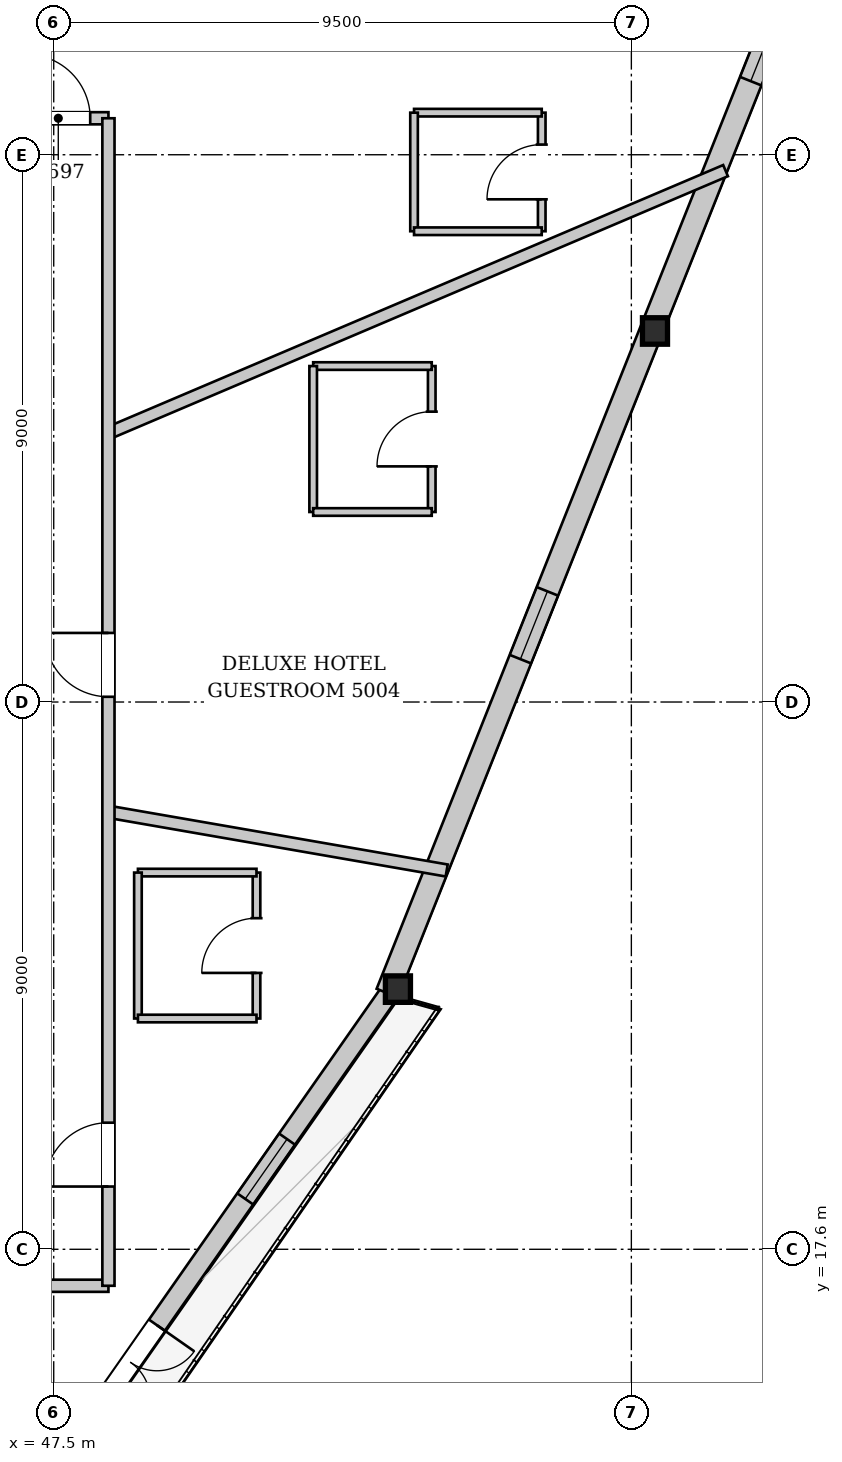
"""IFC4 building model, lengths in metres.
Left out: names, types, materials, properties, quantities, classifications, styles, units other than length and angle.
Written with IfcOpenShell. Run it as: python <this file> out.ifc"""

import sys

from ifc_helpers import new_model, si_unit, direction, frame, frame_2d, origin, origin_2d, place, context, subcontext, project, spatial, rectangle, i_section, extrude, source, transform, mapped, element, fill, save


model = new_model("IFC4")
c1 = context("Model", 3, precision=1e-05, world=origin(), true_north=direction((0.0, 1.0)))
c2 = subcontext(c1, "Body", "Model", "MODEL_VIEW")
j1 = project(units=[si_unit("LENGTHUNIT", "METRE"), si_unit("PLANEANGLEUNIT", "RADIAN")], contexts=[c1])
p1 = place(None, origin())
s1 = spatial("IfcSite", under=j1, at=p1, CompositionType="ELEMENT")
p2 = place(p1, origin())
s2 = spatial("IfcBuilding", under=s1, at=p2, CompositionType="ELEMENT")
p3 = place(p2, frame((0.0, 0.0, 189.2)))
s3 = spatial("IfcBuildingStorey", under=s2, at=p3, CompositionType="ELEMENT", Elevation=189.2)
m1 = source(origin(), c2, "Body", "SweptSolid", [
    extrude(i_section(OverallWidth=0.412, OverallDepth=0.435, WebThickness=0.031, FlangeThickness=0.05, at=origin_2d()), origin(), (0.0, 0.0, 1.0), 3.396),
])
p4 = place(p3, frame((53.164, 21.743, 0.0), z_axis=(-0.001509764212, 0.079873716149, 0.996803847344), x_axis=(-0.999821407128, -0.018898514446, 0.0)))
e1 = element("IfcColumn", 1, at=p4, inside=s3, PredefinedType="COLUMN", context=c2, shape_type="MappedRepresentation", body=[
    mapped(m1, transform((0.0, 0.0, 0.0), x_axis=(1.0, 0.0, 0.0), y_axis=(0.0, 1.0, 0.0), z_axis=(0.0, 0.0, 1.0), scale=1.0)),
])
m2 = source(origin(), c2, "Body", "SweptSolid", [
    extrude(i_section(OverallWidth=0.412, OverallDepth=0.435, WebThickness=0.031, FlangeThickness=0.05, at=origin_2d()), origin(), (0.0, 0.0, 1.0), 3.403),
])
p5 = place(p3, frame((57.468, 32.544, 0.0), z_axis=(-0.046628569909, 0.092468040943, 0.994623264293), x_axis=(-0.892898044648, -0.450258905369, 0.0)))
e2 = element("IfcColumn", 2, at=p5, inside=s3, PredefinedType="COLUMN", context=c2, shape_type="MappedRepresentation", body=[
    mapped(m2, transform((0.0, 0.0, 0.0), x_axis=(1.0, 0.0, 0.0), y_axis=(0.0, 1.0, 0.0), z_axis=(0.0, 0.0, 1.0), scale=1.0)),
])
p6 = place(p3, frame((53.032, 21.835, 0.0), z_axis=(0.0, 0.0, 1.0), x_axis=(-0.573201612269, -0.819414371178, 0.0)))
e3 = element("IfcWall", 3, at=p6, inside=s3, PredefinedType="SOLIDWALL", context=c2, shape_type="SweptSolid", body=[
    extrude(rectangle(XDim=23.255, YDim=0.32, at=frame_2d((11.627, 0.0))), origin(), (0.0, 0.0, 1.0), 2.722),
])
p7 = place(p6, frame((6.691, 0.0, 0.0)))
e4 = element("IfcOpeningElement", 4, at=p7, cuts=e3, PredefinedType="OPENING", context=c2, shape_type="SweptSolid", body=[
    extrude(rectangle(XDim=1.5, YDim=2.3, at=frame_2d((0.75, 1.15))), frame((0.0, 0.17, 0.0), z_axis=(0.0, -1.0, 0.0), x_axis=(1.0, 0.0, 0.0)), (0.0, 0.0, 1.0), 0.34),
])
p8 = place(p6, frame((14.308, 0.0, 0.252)))
e5 = element("IfcOpeningElement", 5, at=p8, cuts=e3, PredefinedType="OPENING", context=c2, shape_type="SweptSolid", body=[
    extrude(rectangle(XDim=2.6, YDim=2.35, at=frame_2d((1.3, 1.175))), frame((0.0, 0.17, 0.0), z_axis=(0.0, -1.0, 0.0), x_axis=(1.0, 0.0, 0.0)), (0.0, 0.0, 1.0), 0.34),
])
p9 = place(p6, frame((2.957, 0.0, 0.65)))
e6 = element("IfcOpeningElement", 6, at=p9, cuts=e3, PredefinedType="OPENING", context=c2, shape_type="SweptSolid", body=[
    extrude(rectangle(XDim=1.2, YDim=1.5, at=frame_2d((0.6, 0.75))), frame((0.0, 0.17, 0.0), z_axis=(0.0, -1.0, 0.0), x_axis=(1.0, 0.0, 0.0)), (0.0, 0.0, 1.0), 0.34),
])
p10 = place(p3, frame((61.596, 43.416, 0.0), z_axis=(0.0, 0.0, 1.0), x_axis=(-0.370190270335, -0.928955953611, 0.0)))
e7 = element("IfcWall", 7, at=p10, inside=s3, PredefinedType="SOLIDWALL", context=c2, shape_type="SweptSolid", body=[
    extrude(rectangle(XDim=23.255, YDim=0.38, at=frame_2d((11.627, 0.0))), origin(), (0.0, 0.0, 1.0), 2.722),
])
p11 = place(p10, frame((5.911, 0.0, 0.65)))
e8 = element("IfcOpeningElement", 8, at=p11, cuts=e7, PredefinedType="OPENING", context=c2, shape_type="SweptSolid", body=[
    extrude(rectangle(XDim=1.2, YDim=1.5, at=frame_2d((0.6, 0.75))), frame((0.0, 0.2, 0.0), z_axis=(0.0, -1.0, 0.0), x_axis=(1.0, 0.0, 0.0)), (0.0, 0.0, 1.0), 0.4),
])
p12 = place(p10, frame((16.143, 0.0, 0.65)))
e9 = element("IfcOpeningElement", 9, at=p12, cuts=e7, PredefinedType="OPENING", context=c2, shape_type="SweptSolid", body=[
    extrude(rectangle(XDim=1.2, YDim=1.5, at=frame_2d((0.6, 0.75))), frame((0.0, 0.2, 0.0), z_axis=(0.0, -1.0, 0.0), x_axis=(1.0, 0.0, 0.0)), (0.0, 0.0, 1.0), 0.4),
])
p13 = place(p3, frame((48.4, 24.795, 0.0), z_axis=(0.0, 0.0, 1.0), x_axis=(0.985274528665, -0.170979832624, 0.0)))
e10 = element("IfcWall", 10, at=p13, inside=s3, PredefinedType="PARTITIONING", context=c2, shape_type="SweptSolid", body=[
    extrude(rectangle(XDim=5.646, YDim=0.2, at=frame_2d((2.823, 0.0))), origin(), (0.0, 0.0, 1.0), 3.33),
])
p14 = place(p3, frame((48.4, 31.023, 0.0), z_axis=(0.0, 0.0, 1.0), x_axis=(0.920240648348, 0.391352972556, 0.0)))
e11 = element("IfcWall", 11, at=p14, inside=s3, PredefinedType="PARTITIONING", context=c2, shape_type="SweptSolid", body=[
    extrude(rectangle(XDim=11.029, YDim=0.2, at=frame_2d((5.514, 0.0))), origin(), (0.0, 0.0, 1.0), 3.33),
])
p15 = place(p3, frame((44.494, 36.2, 0.0), z_axis=(0.0, 0.0, 1.0), x_axis=(0.560293666023, 0.828294034637, 0.0)))
e12 = element("IfcWall", 12, at=p15, inside=s3, PredefinedType="PARTITIONING", context=c2, shape_type="SweptSolid", body=[
    extrude(rectangle(XDim=10.04, YDim=0.2, at=frame_2d((5.02, 0.0))), origin(), (0.0, 0.0, 1.0), 3.33),
])
p16 = place(p3, frame((50.835, 21.395, 0.0), z_axis=(0.0, 0.0, 1.0), x_axis=(0.0, 1.0, 0.0)))
e13 = element("IfcWall", 13, at=p16, inside=s3, PredefinedType="PARTITIONING", context=c2, shape_type="SweptSolid", body=[
    extrude(rectangle(XDim=2.4, YDim=0.125, at=frame_2d((1.2, 0.0))), origin(), (0.0, 0.0, 1.0), 3.33),
])
p17 = place(p16, frame((0.75, 0.0, 0.0)))
e14 = element("IfcOpeningElement", 14, at=p17, cuts=e13, PredefinedType="OPENING", context=c2, shape_type="SweptSolid", body=[
    extrude(rectangle(XDim=0.9, YDim=2.1, at=frame_2d((0.45, 1.05))), frame((0.0, 0.073, 0.0), z_axis=(0.0, -1.0, 0.0), x_axis=(1.0, 0.0, 0.0)), (0.0, 0.0, 1.0), 0.145),
])
p18 = place(p3, frame((50.835, 23.795, 0.0), z_axis=(0.0, 0.0, 1.0), x_axis=(-1.0, 0.0, 0.0)))
e15 = element("IfcWall", 15, at=p18, inside=s3, PredefinedType="PARTITIONING", context=c2, shape_type="SweptSolid", body=[
    extrude(rectangle(XDim=1.95, YDim=0.125, at=frame_2d((0.975, 0.0))), origin(), (0.0, 0.0, 1.0), 3.33),
])
p19 = place(p3, frame((48.885, 23.795, 0.0), z_axis=(0.0, 0.0, 1.0), x_axis=(0.0, -1.0, 0.0)))
e16 = element("IfcWall", 16, at=p19, inside=s3, PredefinedType="PARTITIONING", context=c2, shape_type="SweptSolid", body=[
    extrude(rectangle(XDim=2.4, YDim=0.125, at=frame_2d((1.2, 0.0))), origin(), (0.0, 0.0, 1.0), 3.33),
])
p20 = place(p3, frame((48.885, 21.395, 0.0), z_axis=(0.0, 0.0, 1.0), x_axis=(1.0, 0.0, 0.0)))
e17 = element("IfcWall", 17, at=p20, inside=s3, PredefinedType="PARTITIONING", context=c2, shape_type="SweptSolid", body=[
    extrude(rectangle(XDim=1.95, YDim=0.125, at=frame_2d((0.975, 0.0))), origin(), (0.0, 0.0, 1.0), 3.33),
])
p21 = place(p3, frame((53.717, 29.725, 0.0), z_axis=(0.0, 0.0, 1.0), x_axis=(0.0, 1.0, 0.0)))
e18 = element("IfcWall", 18, at=p21, inside=s3, PredefinedType="PARTITIONING", context=c2, shape_type="SweptSolid", body=[
    extrude(rectangle(XDim=2.4, YDim=0.125, at=frame_2d((1.2, 0.0))), origin(), (0.0, 0.0, 1.0), 3.33),
])
p22 = place(p21, frame((0.75, 0.0, 0.0)))
e19 = element("IfcOpeningElement", 19, at=p22, cuts=e18, PredefinedType="OPENING", context=c2, shape_type="SweptSolid", body=[
    extrude(rectangle(XDim=0.9, YDim=2.1, at=frame_2d((0.45, 1.05))), frame((0.0, 0.073, 0.0), z_axis=(0.0, -1.0, 0.0), x_axis=(1.0, 0.0, 0.0)), (0.0, 0.0, 1.0), 0.145),
])
p23 = place(p3, frame((53.717, 32.125, 0.0), z_axis=(0.0, 0.0, 1.0), x_axis=(-1.0, 0.0, 0.0)))
e20 = element("IfcWall", 20, at=p23, inside=s3, PredefinedType="PARTITIONING", context=c2, shape_type="SweptSolid", body=[
    extrude(rectangle(XDim=1.95, YDim=0.125, at=frame_2d((0.975, 0.0))), origin(), (0.0, 0.0, 1.0), 3.33),
])
p24 = place(p3, frame((51.767, 32.125, 0.0), z_axis=(0.0, 0.0, 1.0), x_axis=(0.0, -1.0, 0.0)))
e21 = element("IfcWall", 21, at=p24, inside=s3, PredefinedType="PARTITIONING", context=c2, shape_type="SweptSolid", body=[
    extrude(rectangle(XDim=2.4, YDim=0.125, at=frame_2d((1.2, 0.0))), origin(), (0.0, 0.0, 1.0), 3.33),
])
p25 = place(p3, frame((51.767, 29.725, 0.0), z_axis=(0.0, 0.0, 1.0), x_axis=(1.0, 0.0, 0.0)))
e22 = element("IfcWall", 22, at=p25, inside=s3, PredefinedType="PARTITIONING", context=c2, shape_type="SweptSolid", body=[
    extrude(rectangle(XDim=1.95, YDim=0.125, at=frame_2d((0.975, 0.0))), origin(), (0.0, 0.0, 1.0), 3.33),
])
p26 = place(p3, frame((55.526, 34.342, 0.0), z_axis=(0.0, 0.0, 1.0), x_axis=(0.0, 1.0, 0.0)))
e23 = element("IfcWall", 23, at=p26, inside=s3, PredefinedType="PARTITIONING", context=c2, shape_type="SweptSolid", body=[
    extrude(rectangle(XDim=1.95, YDim=0.125, at=frame_2d((0.975, 0.0))), origin(), (0.0, 0.0, 1.0), 3.33),
])
p27 = place(p26, frame((0.525, 0.0, 0.0)))
e24 = element("IfcOpeningElement", 24, at=p27, cuts=e23, PredefinedType="OPENING", context=c2, shape_type="SweptSolid", body=[
    extrude(rectangle(XDim=0.9, YDim=2.1, at=frame_2d((0.45, 1.05))), frame((0.0, 0.073, 0.0), z_axis=(0.0, -1.0, 0.0), x_axis=(1.0, 0.0, 0.0)), (0.0, 0.0, 1.0), 0.145),
])
p28 = place(p3, frame((55.526, 36.292, 0.0), z_axis=(0.0, 0.0, 1.0), x_axis=(-1.0, 0.0, 0.0)))
e25 = element("IfcWall", 25, at=p28, inside=s3, PredefinedType="PARTITIONING", context=c2, shape_type="SweptSolid", body=[
    extrude(rectangle(XDim=2.1, YDim=0.125, at=frame_2d((1.05, 0.0))), origin(), (0.0, 0.0, 1.0), 3.33),
])
p29 = place(p3, frame((53.426, 36.292, 0.0), z_axis=(0.0, 0.0, 1.0), x_axis=(0.0, -1.0, 0.0)))
e26 = element("IfcWall", 26, at=p29, inside=s3, PredefinedType="PARTITIONING", context=c2, shape_type="SweptSolid", body=[
    extrude(rectangle(XDim=1.95, YDim=0.125, at=frame_2d((0.975, 0.0))), origin(), (0.0, 0.0, 1.0), 3.33),
])
p30 = place(p3, frame((53.426, 34.342, 0.0), z_axis=(0.0, 0.0, 1.0), x_axis=(1.0, 0.0, 0.0)))
e27 = element("IfcWall", 27, at=p30, inside=s3, PredefinedType="PARTITIONING", context=c2, shape_type="SweptSolid", body=[
    extrude(rectangle(XDim=2.1, YDim=0.125, at=frame_2d((1.05, 0.0))), origin(), (0.0, 0.0, 1.0), 3.33),
])
p31 = place(p3, frame((27.6, 17.0, 0.0), z_axis=(0.0, 0.0, 1.0), x_axis=(1.0, 0.0, 0.0)))
e28 = element("IfcWall", 28, at=p31, inside=s3, PredefinedType="PARTITIONING", context=c2, shape_type="SweptSolid", body=[
    extrude(rectangle(XDim=20.8, YDim=0.2, at=frame_2d((10.4, 0.0))), origin(), (0.0, 0.0, 1.0), 3.33),
])
p32 = place(p31, frame((8.164, 0.0, 0.0)))
e29 = element("IfcOpeningElement", 29, at=p32, cuts=e28, PredefinedType="OPENING", context=c2, shape_type="SweptSolid", body=[
    extrude(rectangle(XDim=1.05, YDim=2.2, at=frame_2d((0.525, 1.1))), frame((0.0, 0.11, 0.0), z_axis=(0.0, -1.0, 0.0), x_axis=(1.0, 0.0, 0.0)), (0.0, 0.0, 1.0), 0.22),
])
p33 = place(p31, frame((15.317, 0.0, 0.0)))
e30 = element("IfcOpeningElement", 30, at=p33, cuts=e28, PredefinedType="OPENING", context=c2, shape_type="SweptSolid", body=[
    extrude(rectangle(XDim=1.05, YDim=2.2, at=frame_2d((0.525, 1.1))), frame((0.0, 0.11, 0.0), z_axis=(0.0, -1.0, 0.0), x_axis=(1.0, 0.0, 0.0)), (0.0, 0.0, 1.0), 0.22),
])
p34 = place(p31, frame((1.25, 0.0, 0.0)))
e31 = element("IfcOpeningElement", 31, at=p34, cuts=e28, PredefinedType="OPENING", context=c2, shape_type="SweptSolid", body=[
    extrude(rectangle(XDim=1.05, YDim=2.2, at=frame_2d((0.525, 1.1))), frame((0.0, 0.11, 0.0), z_axis=(0.0, -1.0, 0.0), x_axis=(1.0, 0.0, 0.0)), (0.0, 0.0, 1.0), 0.22),
])
p35 = place(p3, frame((43.4, 36.2, 0.0), z_axis=(0.0, 0.0, 1.0), x_axis=(1.0, 0.0, 0.0)))
e32 = element("IfcWall", 32, at=p35, inside=s3, PredefinedType="PARTITIONING", context=c2, shape_type="SweptSolid", body=[
    extrude(rectangle(XDim=5.0, YDim=0.2, at=frame_2d((2.5, 0.0))), origin(), (0.0, 0.0, 1.0), 3.33),
])
p36 = place(p35, frame((3.65, 0.0, 0.0)))
e33 = element("IfcOpeningElement", 33, at=p36, cuts=e32, PredefinedType="OPENING", context=c2, shape_type="SweptSolid", body=[
    extrude(rectangle(XDim=1.05, YDim=2.2, at=frame_2d((0.525, 1.1))), frame((0.0, 0.11, 0.0), z_axis=(0.0, -1.0, 0.0), x_axis=(1.0, 0.0, 0.0)), (0.0, 0.0, 1.0), 0.22),
])
p37 = place(p3, frame((48.4, 17.0, 0.0), z_axis=(0.0, 0.0, 1.0), x_axis=(0.0, 1.0, 0.0)))
e34 = element("IfcWall", 34, at=p37, inside=s3, PredefinedType="PARTITIONING", context=c2, shape_type="SweptSolid", body=[
    extrude(rectangle(XDim=19.2, YDim=0.2, at=frame_2d((9.6, 0.0))), origin(), (0.0, 0.0, 1.0), 3.33),
])
p38 = place(p37, frame((1.632, 0.0, 0.0)))
e35 = element("IfcOpeningElement", 35, at=p38, cuts=e34, PredefinedType="OPENING", context=c2, shape_type="SweptSolid", body=[
    extrude(rectangle(XDim=1.05, YDim=2.2, at=frame_2d((0.525, 1.1))), frame((0.0, 0.11, 0.0), z_axis=(0.0, -1.0, 0.0), x_axis=(1.0, 0.0, 0.0)), (0.0, 0.0, 1.0), 0.22),
])
p39 = place(p37, frame((9.686, 0.0, 0.0)))
e36 = element("IfcOpeningElement", 36, at=p39, cuts=e34, PredefinedType="OPENING", context=c2, shape_type="SweptSolid", body=[
    extrude(rectangle(XDim=1.05, YDim=2.2, at=frame_2d((0.525, 1.1))), frame((0.0, 0.11, 0.0), z_axis=(0.0, -1.0, 0.0), x_axis=(1.0, 0.0, 0.0)), (0.0, 0.0, 1.0), 0.22),
])
m3 = source(origin(), c2, "Body", "SweptSolid", [
    extrude(rectangle(XDim=1.5, YDim=2.3, at=frame_2d((0.75, 1.15))), frame((0.0, 0.025, 0.0), z_axis=(0.0, -1.0, 0.0), x_axis=(1.0, 0.0, 0.0)), (0.0, 0.0, 1.0), 0.05),
])
p40 = place(p7, origin())
e37 = element("IfcDoor", 37, at=p40, inside=s3, OperationType="DOUBLE_DOOR_SINGLE_SWING", PredefinedType="DOOR", context=c2, shape_type="MappedRepresentation", body=[
    mapped(m3, transform((0.0, 0.0, 0.0), x_axis=(1.0, 0.0, 0.0), y_axis=(0.0, 1.0, 0.0), z_axis=(0.0, 0.0, 1.0), scale=1.0)),
])
fill(e4, e37)
m4 = source(origin(), c2, "Body", "SweptSolid", [
    extrude(rectangle(XDim=1.2, YDim=1.5, at=frame_2d((0.6, 0.75))), frame((0.0, 0.03, 0.0), z_axis=(0.0, -1.0, 0.0), x_axis=(1.0, 0.0, 0.0)), (0.0, 0.0, 1.0), 0.06),
])
p41 = place(p11, origin())
e38 = element("IfcWindow", 38, at=p41, inside=s3, PartitioningType="SINGLE_PANEL", PredefinedType="WINDOW", context=c2, shape_type="MappedRepresentation", body=[
    mapped(m4, transform((0.0, 0.0, 0.0), x_axis=(1.0, 0.0, 0.0), y_axis=(0.0, 1.0, 0.0), z_axis=(0.0, 0.0, 1.0), scale=1.0)),
])
fill(e8, e38)
p42 = place(p12, origin())
e39 = element("IfcWindow", 39, at=p42, inside=s3, PartitioningType="SINGLE_PANEL", PredefinedType="WINDOW", context=c2, shape_type="MappedRepresentation", body=[
    mapped(m4, transform((0.0, 0.0, 0.0), x_axis=(1.0, 0.0, 0.0), y_axis=(0.0, 1.0, 0.0), z_axis=(0.0, 0.0, 1.0), scale=1.0)),
])
fill(e9, e39)
p43 = place(p9, origin())
e40 = element("IfcWindow", 40, at=p43, inside=s3, PartitioningType="SINGLE_PANEL", PredefinedType="WINDOW", context=c2, shape_type="MappedRepresentation", body=[
    mapped(m4, transform((0.0, 0.0, 0.0), x_axis=(1.0, 0.0, 0.0), y_axis=(0.0, 1.0, 0.0), z_axis=(0.0, 0.0, 1.0), scale=1.0)),
])
fill(e6, e40)
m5 = source(origin(), c2, "Body", "SweptSolid", [
    extrude(rectangle(XDim=0.9, YDim=2.1, at=frame_2d((0.45, 1.05))), frame((0.0, 0.025, 0.0), z_axis=(0.0, -1.0, 0.0), x_axis=(1.0, 0.0, 0.0)), (0.0, 0.0, 1.0), 0.05),
])
p44 = place(p17, origin())
e41 = element("IfcDoor", 41, at=p44, inside=s3, OperationType="SINGLE_SWING_LEFT", PredefinedType="DOOR", context=c2, shape_type="MappedRepresentation", body=[
    mapped(m5, transform((0.0, 0.0, 0.0), x_axis=(1.0, 0.0, 0.0), y_axis=(0.0, 1.0, 0.0), z_axis=(0.0, 0.0, 1.0), scale=1.0)),
])
fill(e14, e41)
p45 = place(p22, origin())
e42 = element("IfcDoor", 42, at=p45, inside=s3, OperationType="SINGLE_SWING_LEFT", PredefinedType="DOOR", context=c2, shape_type="MappedRepresentation", body=[
    mapped(m5, transform((0.0, 0.0, 0.0), x_axis=(1.0, 0.0, 0.0), y_axis=(0.0, 1.0, 0.0), z_axis=(0.0, 0.0, 1.0), scale=1.0)),
])
fill(e19, e42)
p46 = place(p27, origin())
e43 = element("IfcDoor", 43, at=p46, inside=s3, OperationType="SINGLE_SWING_LEFT", PredefinedType="DOOR", context=c2, shape_type="MappedRepresentation", body=[
    mapped(m5, transform((0.0, 0.0, 0.0), x_axis=(1.0, 0.0, 0.0), y_axis=(0.0, 1.0, 0.0), z_axis=(0.0, 0.0, 1.0), scale=1.0)),
])
fill(e24, e43)
m6 = source(origin(), c2, "Body", "SweptSolid", [
    extrude(rectangle(XDim=1.05, YDim=2.2, at=frame_2d((0.525, 1.1))), frame((0.0, 0.025, 0.0), z_axis=(0.0, -1.0, 0.0), x_axis=(1.0, 0.0, 0.0)), (0.0, 0.0, 1.0), 0.05),
])
p47 = place(p36, origin())
e44 = element("IfcDoor", 44, at=p47, inside=s3, OperationType="SINGLE_SWING_LEFT", PredefinedType="DOOR", context=c2, shape_type="MappedRepresentation", body=[
    mapped(m6, transform((0.0, 0.0, 0.0), x_axis=(1.0, 0.0, 0.0), y_axis=(0.0, 1.0, 0.0), z_axis=(0.0, 0.0, 1.0), scale=1.0)),
])
fill(e33, e44)
p48 = place(p38, origin())
e45 = element("IfcDoor", 45, at=p48, inside=s3, OperationType="SINGLE_SWING_LEFT", PredefinedType="DOOR", context=c2, shape_type="MappedRepresentation", body=[
    mapped(m6, transform((0.0, 0.0, 0.0), x_axis=(1.0, 0.0, 0.0), y_axis=(0.0, 1.0, 0.0), z_axis=(0.0, 0.0, 1.0), scale=1.0)),
])
fill(e35, e45)
p49 = place(p39, origin())
e46 = element("IfcDoor", 46, at=p49, inside=s3, OperationType="SINGLE_SWING_RIGHT", PredefinedType="DOOR", context=c2, shape_type="MappedRepresentation", body=[
    mapped(m6, transform((0.0, 0.0, 0.0), x_axis=(1.0, 0.0, 0.0), y_axis=(0.0, 1.0, 0.0), z_axis=(0.0, 0.0, 1.0), scale=1.0)),
])
fill(e36, e46)
save(model, sys.argv[1])
